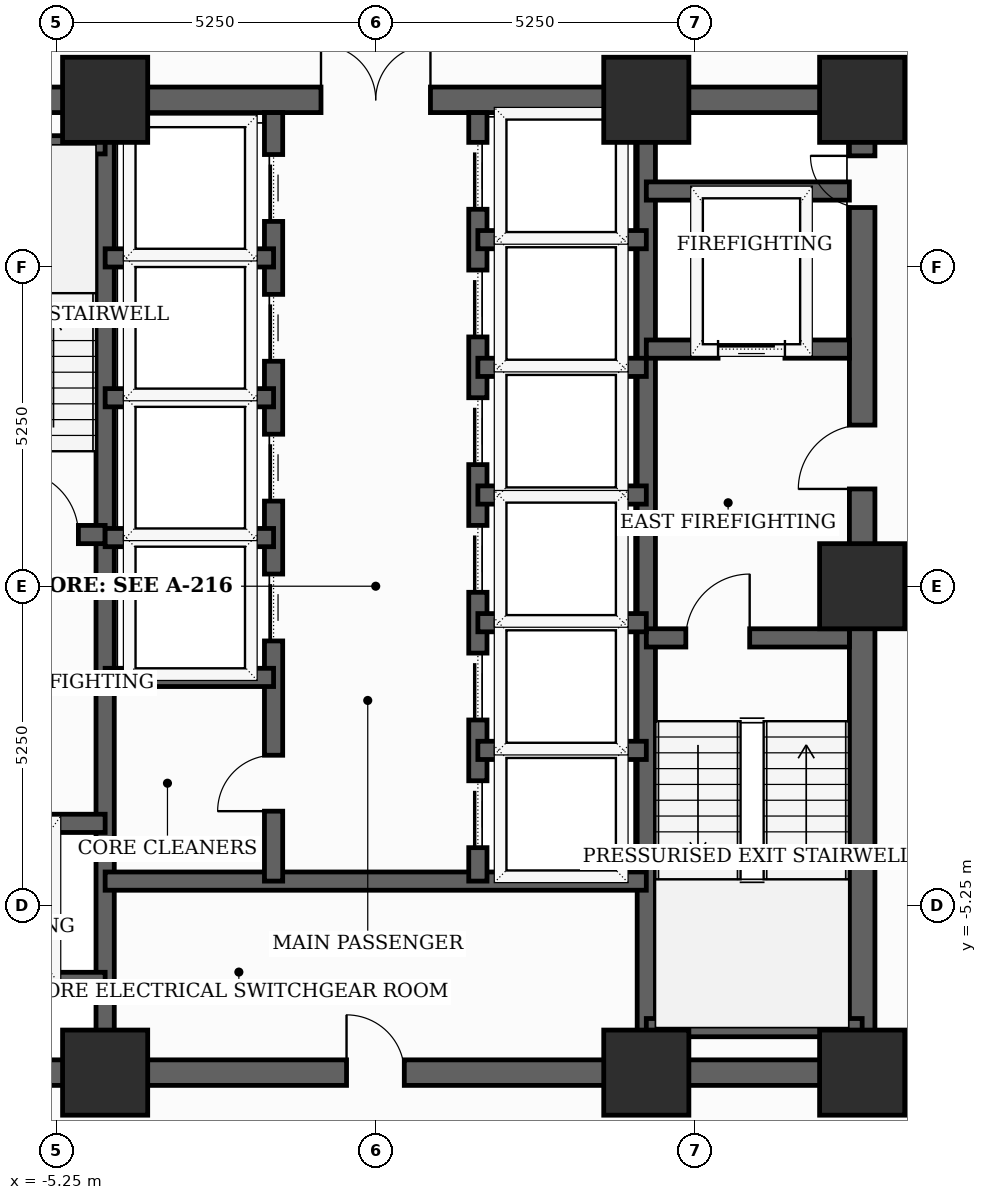
"""IFC4 building model, lengths in metres.
Left out: names, types, materials, properties, quantities, classifications, styles, units other than length and angle.
Written with IfcOpenShell. Run it as: python <this file> out.ifc"""

import sys

from ifc_helpers import new_model, si_unit, direction, frame, frame_2d, origin, origin_2d, place, context, subcontext, project, spatial, rectangle, extrude, element, fill, save


model = new_model("IFC4")
c1 = context("Model", 3, precision=1e-05, world=origin(), true_north=direction((0.0, 1.0)))
c2 = subcontext(c1, "Body", "Model", "MODEL_VIEW")
j1 = project(units=[si_unit("LENGTHUNIT", "METRE"), si_unit("PLANEANGLEUNIT", "RADIAN")], contexts=[c1])
p1 = place(None, origin())
s1 = spatial("IfcSite", under=j1, at=p1, CompositionType="ELEMENT")
p2 = place(p1, origin())
s2 = spatial("IfcBuilding", under=s1, at=p2, CompositionType="ELEMENT")
p3 = place(p2, frame((0.0, 0.0, 94.0)))
s3 = spatial("IfcBuildingStorey", under=s2, at=p3, CompositionType="ELEMENT", Elevation=94.0)
for number, where, z_axis, x_axis in (
    (1, (-4.45, -8.0, 0.0), (0.0, 0.0, 1.0), (1.0, 0.0, 0.0)),
    (2, (4.45, -8.0, 0.0), (0.0, 0.0, 1.0), (1.0, 0.0, 0.0)),
    (3, (8.0, -8.0, 0.0), (0.0, 0.0, 1.0), (1.0, 0.0, 0.0)),
    (4, (8.0, 0.0, 0.0), (0.0, 0.0, 1.0), (1.0, 0.0, 0.0)),
    (5, (8.0, 8.0, 0.0), (0.0, 0.0, 1.0), (1.0, 0.0, 0.0)),
    (6, (4.45, 8.0, 0.0), (0.0, 0.0, 1.0), (1.0, 0.0, 0.0)),
    (7, (-4.45, 8.0, 0.0), (0.0, 0.0, 1.0), (1.0, 0.0, 0.0)),
):
    element("IfcColumn", number, at=place(p3, frame(where, z_axis=z_axis, x_axis=x_axis)), inside=s3, PredefinedType="COLUMN", context=c2, shape_type="SweptSolid", body=[
        extrude(rectangle(XDim=1.4, YDim=1.4, at=origin_2d()), origin(), (0.0, 0.0, 1.0), 3.7),
    ])
p4 = place(p3, frame((8.0, -8.0, 0.0), z_axis=(0.0, 0.0, 1.0), x_axis=(0.0, 1.0, 0.0)))
e8 = element("IfcWall", 8, at=p4, inside=s3, PredefinedType="SHEAR", context=c2, shape_type="SweptSolid", body=[
    extrude(rectangle(XDim=16.0, YDim=0.42, at=frame_2d((8.0, 0.0))), origin(), (0.0, 0.0, 1.0), 3.5),
])
p5 = place(p4, frame((9.6, 0.0, 0.0)))
e9 = element("IfcOpeningElement", 9, at=p5, cuts=e8, PredefinedType="OPENING", context=c2, shape_type="SweptSolid", body=[
    extrude(rectangle(XDim=1.05, YDim=2.15, at=frame_2d((0.525, 1.075))), frame((0.0, 0.22, 0.0), z_axis=(0.0, -1.0, 0.0), x_axis=(1.0, 0.0, 0.0)), (0.0, 0.0, 1.0), 0.44),
])
p6 = place(p4, frame((14.229, 0.0, 0.0)))
e10 = element("IfcOpeningElement", 10, at=p6, cuts=e8, PredefinedType="OPENING", context=c2, shape_type="SweptSolid", body=[
    extrude(rectangle(XDim=0.85, YDim=2.02, at=frame_2d((0.425, 1.01))), frame((0.0, 0.22, 0.0), z_axis=(0.0, -1.0, 0.0), x_axis=(1.0, 0.0, 0.0)), (0.0, 0.0, 1.0), 0.44),
])
p7 = place(p3, frame((-8.0, -8.0, 0.0), z_axis=(0.0, 0.0, 1.0), x_axis=(1.0, 0.0, 0.0)))
e11 = element("IfcWall", 11, at=p7, inside=s3, PredefinedType="SHEAR", context=c2, shape_type="SweptSolid", body=[
    extrude(rectangle(XDim=16.0, YDim=0.42, at=frame_2d((8.0, 0.0))), origin(), (0.0, 0.0, 1.0), 3.5),
])
p8 = place(p7, frame((7.52, 0.0, 0.0)))
e12 = element("IfcOpeningElement", 12, at=p8, cuts=e11, PredefinedType="OPENING", context=c2, shape_type="SweptSolid", body=[
    extrude(rectangle(XDim=0.95, YDim=2.1, at=frame_2d((0.475, 1.05))), frame((0.0, 0.22, 0.0), z_axis=(0.0, -1.0, 0.0), x_axis=(1.0, 0.0, 0.0)), (0.0, 0.0, 1.0), 0.44),
])
p9 = place(p3, frame((-8.0, 8.0, 0.0), z_axis=(0.0, 0.0, 1.0), x_axis=(1.0, 0.0, 0.0)))
e13 = element("IfcWall", 13, at=p9, inside=s3, PredefinedType="SHEAR", context=c2, shape_type="SweptSolid", body=[
    extrude(rectangle(XDim=16.0, YDim=0.42, at=frame_2d((8.0, 0.0))), origin(), (0.0, 0.0, 1.0), 3.5),
])
p10 = place(p9, frame((7.1, 0.0, 0.0)))
e14 = element("IfcOpeningElement", 14, at=p10, cuts=e13, PredefinedType="OPENING", context=c2, shape_type="SweptSolid", body=[
    extrude(rectangle(XDim=1.8, YDim=2.15, at=frame_2d((0.9, 1.075))), frame((0.0, 0.22, 0.0), z_axis=(0.0, -1.0, 0.0), x_axis=(1.0, 0.0, 0.0)), (0.0, 0.0, 1.0), 0.44),
])
for number, where, z_axis, x_axis in (
    (15, (-4.45, -7.79, 0.0), (0.0, 0.0, 1.0), (0.0, 1.0, 0.0)),
    (16, (4.45, -7.79, 0.0), (0.0, 0.0, 1.0), (0.0, 1.0, 0.0)),
):
    element("IfcWall", number, at=place(p3, frame(where, z_axis=z_axis, x_axis=x_axis)), inside=s3, PredefinedType="SHEAR", context=c2, shape_type="SweptSolid", body=[
        extrude(rectangle(XDim=15.58, YDim=0.3, at=frame_2d((7.79, 0.0))), origin(), (0.0, 0.0, 1.0), 3.5),
    ])
p11 = place(p3, frame((-7.79, 0.85, 0.0), z_axis=(0.0, 0.0, 1.0), x_axis=(1.0, 0.0, 0.0)))
e17 = element("IfcWall", 17, at=p11, inside=s3, PredefinedType="SHEAR", context=c2, shape_type="SweptSolid", body=[
    extrude(rectangle(XDim=3.34, YDim=0.3, at=frame_2d((1.67, 0.0))), origin(), (0.0, 0.0, 1.0), 3.5),
])
p12 = place(p11, frame((1.85, 0.0, 0.0)))
e18 = element("IfcOpeningElement", 18, at=p12, cuts=e17, PredefinedType="OPENING", context=c2, shape_type="SweptSolid", body=[
    extrude(rectangle(XDim=1.05, YDim=2.15, at=frame_2d((0.525, 1.075))), frame((0.0, 0.16, 0.0), z_axis=(0.0, -1.0, 0.0), x_axis=(1.0, 0.0, 0.0)), (0.0, 0.0, 1.0), 0.32),
])
p13 = place(p3, frame((-7.79, 7.26, 0.0), z_axis=(0.0, 0.0, 1.0), x_axis=(1.0, 0.0, 0.0)))
e19 = element("IfcWall", 19, at=p13, inside=s3, PredefinedType="SHEAR", context=c2, shape_type="SweptSolid", body=[
    extrude(rectangle(XDim=3.34, YDim=0.3, at=frame_2d((1.67, 0.0))), origin(), (0.0, 0.0, 1.0), 3.5),
])
p14 = place(p3, frame((4.45, -0.85, 0.0), z_axis=(0.0, 0.0, 1.0), x_axis=(1.0, 0.0, 0.0)))
e20 = element("IfcWall", 20, at=p14, inside=s3, PredefinedType="SHEAR", context=c2, shape_type="SweptSolid", body=[
    extrude(rectangle(XDim=3.34, YDim=0.3, at=frame_2d((1.67, 0.0))), origin(), (0.0, 0.0, 1.0), 3.5),
])
p15 = place(p14, frame((0.65, 0.0, 0.0)))
e21 = element("IfcOpeningElement", 21, at=p15, cuts=e20, PredefinedType="OPENING", context=c2, shape_type="SweptSolid", body=[
    extrude(rectangle(XDim=1.05, YDim=2.15, at=frame_2d((0.525, 1.075))), frame((0.0, 0.16, 0.0), z_axis=(0.0, -1.0, 0.0), x_axis=(1.0, 0.0, 0.0)), (0.0, 0.0, 1.0), 0.32),
])
p16 = place(p3, frame((4.45, -7.26, 0.0), z_axis=(0.0, 0.0, 1.0), x_axis=(1.0, 0.0, 0.0)))
e22 = element("IfcWall", 22, at=p16, inside=s3, PredefinedType="SHEAR", context=c2, shape_type="SweptSolid", body=[
    extrude(rectangle(XDim=3.55, YDim=0.3, at=frame_2d((1.775, 0.0))), origin(), (0.0, 0.0, 1.0), 3.5),
])
p17 = place(p3, frame((-7.79, -3.9, 0.0), z_axis=(0.0, 0.0, 1.0), x_axis=(1.0, 0.0, 0.0)))
e23 = element("IfcWall", 23, at=p17, inside=s3, PredefinedType="SHEAR", context=c2, shape_type="SweptSolid", body=[
    extrude(rectangle(XDim=3.34, YDim=0.3, at=frame_2d((1.67, 0.0))), origin(), (0.0, 0.0, 1.0), 3.5),
])
p18 = place(p17, frame((1.27, 0.0, 0.0)))
e24 = element("IfcOpeningElement", 24, at=p18, cuts=e23, PredefinedType="OPENING", context=c2, shape_type="SweptSolid", body=[
    extrude(rectangle(XDim=1.1, YDim=2.1, at=frame_2d((0.55, 1.05))), frame((0.0, 0.16, 0.0), z_axis=(0.0, -1.0, 0.0), x_axis=(1.0, 0.0, 0.0)), (0.0, 0.0, 1.0), 0.32),
])
p19 = place(p3, frame((-7.79, -6.5, 0.0), z_axis=(0.0, 0.0, 1.0), x_axis=(1.0, 0.0, 0.0)))
e25 = element("IfcWall", 25, at=p19, inside=s3, PredefinedType="SHEAR", context=c2, shape_type="SweptSolid", body=[
    extrude(rectangle(XDim=3.34, YDim=0.3, at=frame_2d((1.67, 0.0))), origin(), (0.0, 0.0, 1.0), 3.5),
])
p20 = place(p3, frame((4.45, 3.9, 0.0), z_axis=(0.0, 0.0, 1.0), x_axis=(1.0, 0.0, 0.0)))
e26 = element("IfcWall", 26, at=p20, inside=s3, PredefinedType="SHEAR", context=c2, shape_type="SweptSolid", body=[
    extrude(rectangle(XDim=3.34, YDim=0.3, at=frame_2d((1.67, 0.0))), origin(), (0.0, 0.0, 1.0), 3.5),
])
p21 = place(p20, frame((1.18, 0.0, 0.0)))
e27 = element("IfcOpeningElement", 27, at=p21, cuts=e26, PredefinedType="OPENING", context=c2, shape_type="SweptSolid", body=[
    extrude(rectangle(XDim=1.1, YDim=2.1, at=frame_2d((0.55, 1.05))), frame((0.0, 0.16, 0.0), z_axis=(0.0, -1.0, 0.0), x_axis=(1.0, 0.0, 0.0)), (0.0, 0.0, 1.0), 0.32),
])
p22 = place(p3, frame((4.45, 6.5, 0.0), z_axis=(0.0, 0.0, 1.0), x_axis=(1.0, 0.0, 0.0)))
e28 = element("IfcWall", 28, at=p22, inside=s3, PredefinedType="SHEAR", context=c2, shape_type="SweptSolid", body=[
    extrude(rectangle(XDim=3.34, YDim=0.3, at=frame_2d((1.67, 0.0))), origin(), (0.0, 0.0, 1.0), 3.5),
])
p23 = place(p3, frame((-4.45, -4.85, 0.0), z_axis=(0.0, 0.0, 1.0), x_axis=(1.0, 0.0, 0.0)))
e29 = element("IfcWall", 29, at=p23, inside=s3, PredefinedType="SHEAR", context=c2, shape_type="SweptSolid", body=[
    extrude(rectangle(XDim=8.9, YDim=0.3, at=frame_2d((4.45, 0.0))), origin(), (0.0, 0.0, 1.0), 3.5),
])
p24 = place(p3, frame((-1.68, -4.85, 0.0), z_axis=(0.0, 0.0, 1.0), x_axis=(0.0, 1.0, 0.0)))
e30 = element("IfcWall", 30, at=p24, inside=s3, PredefinedType="SHEAR", context=c2, shape_type="SweptSolid", body=[
    extrude(rectangle(XDim=12.64, YDim=0.3, at=frame_2d((6.32, 0.0))), origin(), (0.0, 0.0, 1.0), 3.5),
])
p25 = place(p24, frame((3.95, 0.0, 0.0)))
e31 = element("IfcOpeningElement", 31, at=p25, cuts=e30, PredefinedType="OPENING", context=c2, shape_type="SweptSolid", body=[
    extrude(rectangle(XDim=1.1, YDim=2.1, at=frame_2d((0.55, 1.05))), frame((0.0, 0.16, 0.0), z_axis=(0.0, -1.0, 0.0), x_axis=(1.0, 0.0, 0.0)), (0.0, 0.0, 1.0), 0.32),
])
p26 = place(p24, frame((6.25, 0.0, 0.0)))
e32 = element("IfcOpeningElement", 32, at=p26, cuts=e30, PredefinedType="OPENING", context=c2, shape_type="SweptSolid", body=[
    extrude(rectangle(XDim=1.1, YDim=2.1, at=frame_2d((0.55, 1.05))), frame((0.0, 0.16, 0.0), z_axis=(0.0, -1.0, 0.0), x_axis=(1.0, 0.0, 0.0)), (0.0, 0.0, 1.0), 0.32),
])
p27 = place(p24, frame((8.55, 0.0, 0.0)))
e33 = element("IfcOpeningElement", 33, at=p27, cuts=e30, PredefinedType="OPENING", context=c2, shape_type="SweptSolid", body=[
    extrude(rectangle(XDim=1.1, YDim=2.1, at=frame_2d((0.55, 1.05))), frame((0.0, 0.16, 0.0), z_axis=(0.0, -1.0, 0.0), x_axis=(1.0, 0.0, 0.0)), (0.0, 0.0, 1.0), 0.32),
])
p28 = place(p24, frame((10.85, 0.0, 0.0)))
e34 = element("IfcOpeningElement", 34, at=p28, cuts=e30, PredefinedType="OPENING", context=c2, shape_type="SweptSolid", body=[
    extrude(rectangle(XDim=1.1, YDim=2.1, at=frame_2d((0.55, 1.05))), frame((0.0, 0.16, 0.0), z_axis=(0.0, -1.0, 0.0), x_axis=(1.0, 0.0, 0.0)), (0.0, 0.0, 1.0), 0.32),
])
p29 = place(p24, frame((1.15, 0.0, 0.0)))
e35 = element("IfcOpeningElement", 35, at=p29, cuts=e30, PredefinedType="OPENING", context=c2, shape_type="SweptSolid", body=[
    extrude(rectangle(XDim=0.92, YDim=2.1, at=frame_2d((0.46, 1.05))), frame((0.0, 0.16, 0.0), z_axis=(0.0, -1.0, 0.0), x_axis=(1.0, 0.0, 0.0)), (0.0, 0.0, 1.0), 0.32),
])
p30 = place(p3, frame((1.68, -4.85, 0.0), z_axis=(0.0, 0.0, 1.0), x_axis=(0.0, 1.0, 0.0)))
e36 = element("IfcWall", 36, at=p30, inside=s3, PredefinedType="SHEAR", context=c2, shape_type="SweptSolid", body=[
    extrude(rectangle(XDim=12.64, YDim=0.3, at=frame_2d((6.32, 0.0))), origin(), (0.0, 0.0, 1.0), 3.5),
])
p31 = place(p30, frame((0.55, 0.0, 0.0)))
e37 = element("IfcOpeningElement", 37, at=p31, cuts=e36, PredefinedType="OPENING", context=c2, shape_type="SweptSolid", body=[
    extrude(rectangle(XDim=1.1, YDim=2.1, at=frame_2d((0.55, 1.05))), frame((0.0, 0.16, 0.0), z_axis=(0.0, -1.0, 0.0), x_axis=(1.0, 0.0, 0.0)), (0.0, 0.0, 1.0), 0.32),
])
p32 = place(p30, frame((2.65, 0.0, 0.0)))
e38 = element("IfcOpeningElement", 38, at=p32, cuts=e36, PredefinedType="OPENING", context=c2, shape_type="SweptSolid", body=[
    extrude(rectangle(XDim=1.1, YDim=2.1, at=frame_2d((0.55, 1.05))), frame((0.0, 0.16, 0.0), z_axis=(0.0, -1.0, 0.0), x_axis=(1.0, 0.0, 0.0)), (0.0, 0.0, 1.0), 0.32),
])
p33 = place(p30, frame((4.75, 0.0, 0.0)))
e39 = element("IfcOpeningElement", 39, at=p33, cuts=e36, PredefinedType="OPENING", context=c2, shape_type="SweptSolid", body=[
    extrude(rectangle(XDim=1.1, YDim=2.1, at=frame_2d((0.55, 1.05))), frame((0.0, 0.16, 0.0), z_axis=(0.0, -1.0, 0.0), x_axis=(1.0, 0.0, 0.0)), (0.0, 0.0, 1.0), 0.32),
])
p34 = place(p30, frame((6.85, 0.0, 0.0)))
e40 = element("IfcOpeningElement", 40, at=p34, cuts=e36, PredefinedType="OPENING", context=c2, shape_type="SweptSolid", body=[
    extrude(rectangle(XDim=1.1, YDim=2.1, at=frame_2d((0.55, 1.05))), frame((0.0, 0.16, 0.0), z_axis=(0.0, -1.0, 0.0), x_axis=(1.0, 0.0, 0.0)), (0.0, 0.0, 1.0), 0.32),
])
p35 = place(p30, frame((8.95, 0.0, 0.0)))
e41 = element("IfcOpeningElement", 41, at=p35, cuts=e36, PredefinedType="OPENING", context=c2, shape_type="SweptSolid", body=[
    extrude(rectangle(XDim=1.1, YDim=2.1, at=frame_2d((0.55, 1.05))), frame((0.0, 0.16, 0.0), z_axis=(0.0, -1.0, 0.0), x_axis=(1.0, 0.0, 0.0)), (0.0, 0.0, 1.0), 0.32),
])
p36 = place(p30, frame((11.05, 0.0, 0.0)))
e42 = element("IfcOpeningElement", 42, at=p36, cuts=e36, PredefinedType="OPENING", context=c2, shape_type="SweptSolid", body=[
    extrude(rectangle(XDim=1.1, YDim=2.1, at=frame_2d((0.55, 1.05))), frame((0.0, 0.16, 0.0), z_axis=(0.0, -1.0, 0.0), x_axis=(1.0, 0.0, 0.0)), (0.0, 0.0, 1.0), 0.32),
])
for number, where, z_axis, x_axis in (
    (43, (-4.45, -1.5, 0.0), (0.0, 0.0, 1.0), (1.0, 0.0, 0.0)),
    (44, (-4.45, 0.8, 0.0), (0.0, 0.0, 1.0), (1.0, 0.0, 0.0)),
    (45, (-4.45, 3.1, 0.0), (0.0, 0.0, 1.0), (1.0, 0.0, 0.0)),
    (46, (-4.45, 5.4, 0.0), (0.0, 0.0, 1.0), (1.0, 0.0, 0.0)),
    (47, (1.68, 1.5, 0.0), (0.0, 0.0, 1.0), (1.0, 0.0, 0.0)),
    (48, (1.68, 3.6, 0.0), (0.0, 0.0, 1.0), (1.0, 0.0, 0.0)),
    (49, (1.68, 5.7, 0.0), (0.0, 0.0, 1.0), (1.0, 0.0, 0.0)),
    (50, (1.68, -2.7, 0.0), (0.0, 0.0, 1.0), (1.0, 0.0, 0.0)),
    (51, (1.68, -0.6, 0.0), (0.0, 0.0, 1.0), (1.0, 0.0, 0.0)),
):
    element("IfcWall", number, at=place(p3, frame(where, z_axis=z_axis, x_axis=x_axis)), inside=s3, PredefinedType="SHEAR", context=c2, shape_type="SweptSolid", body=[
        extrude(rectangle(XDim=2.77, YDim=0.3, at=frame_2d((1.385, 0.0))), origin(), (0.0, 0.0, 1.0), 3.5),
    ])
p37 = place(p5, origin())
e52 = element("IfcDoor", 52, at=p37, inside=s3, OperationType="SINGLE_SWING_LEFT", PredefinedType="DOOR", context=c2, shape_type="SweptSolid", body=[
    extrude(rectangle(XDim=1.05, YDim=2.15, at=frame_2d((0.525, 1.075))), frame((0.0, 0.025, 0.0), z_axis=(0.0, -1.0, 0.0), x_axis=(1.0, 0.0, 0.0)), (0.0, 0.0, 1.0), 0.05),
])
fill(e9, e52)
p38 = place(p6, origin())
e53 = element("IfcDoor", 53, at=p38, inside=s3, OperationType="SINGLE_SWING_RIGHT", PredefinedType="TRAPDOOR", context=c2, shape_type="SweptSolid", body=[
    extrude(rectangle(XDim=0.85, YDim=2.02, at=frame_2d((0.425, 1.01))), frame((0.0, 0.025, 0.0), z_axis=(0.0, -1.0, 0.0), x_axis=(1.0, 0.0, 0.0)), (0.0, 0.0, 1.0), 0.05),
])
fill(e10, e53)
p39 = place(p8, origin())
e54 = element("IfcDoor", 54, at=p39, inside=s3, OperationType="SINGLE_SWING_LEFT", PredefinedType="DOOR", context=c2, shape_type="SweptSolid", body=[
    extrude(rectangle(XDim=0.95, YDim=2.1, at=frame_2d((0.475, 1.05))), frame((0.0, 0.025, 0.0), z_axis=(0.0, -1.0, 0.0), x_axis=(1.0, 0.0, 0.0)), (0.0, 0.0, 1.0), 0.05),
])
fill(e12, e54)
p40 = place(p10, origin())
e55 = element("IfcDoor", 55, at=p40, inside=s3, OperationType="DOUBLE_DOOR_SINGLE_SWING", PredefinedType="DOOR", context=c2, shape_type="SweptSolid", body=[
    extrude(rectangle(XDim=1.8, YDim=2.15, at=frame_2d((0.9, 1.075))), frame((0.0, 0.025, 0.0), z_axis=(0.0, -1.0, 0.0), x_axis=(1.0, 0.0, 0.0)), (0.0, 0.0, 1.0), 0.05),
])
fill(e14, e55)
p41 = place(p12, origin())
e56 = element("IfcDoor", 56, at=p41, inside=s3, OperationType="SINGLE_SWING_LEFT", PredefinedType="DOOR", context=c2, shape_type="SweptSolid", body=[
    extrude(rectangle(XDim=1.05, YDim=2.15, at=frame_2d((0.525, 1.075))), frame((0.0, 0.025, 0.0), z_axis=(0.0, -1.0, 0.0), x_axis=(1.0, 0.0, 0.0)), (0.0, 0.0, 1.0), 0.05),
])
fill(e18, e56)
p42 = place(p15, origin())
e57 = element("IfcDoor", 57, at=p42, inside=s3, OperationType="SINGLE_SWING_RIGHT", PredefinedType="DOOR", context=c2, shape_type="SweptSolid", body=[
    extrude(rectangle(XDim=1.05, YDim=2.15, at=frame_2d((0.525, 1.075))), frame((0.0, 0.025, 0.0), z_axis=(0.0, -1.0, 0.0), x_axis=(1.0, 0.0, 0.0)), (0.0, 0.0, 1.0), 0.05),
])
fill(e21, e57)
p43 = place(p21, origin())
e58 = element("IfcDoor", 58, at=p43, inside=s3, OperationType="SLIDING_TO_LEFT", PredefinedType="DOOR", context=c2, shape_type="SweptSolid", body=[
    extrude(rectangle(XDim=1.1, YDim=2.1, at=frame_2d((0.55, 1.05))), frame((0.0, 0.025, 0.0), z_axis=(0.0, -1.0, 0.0), x_axis=(1.0, 0.0, 0.0)), (0.0, 0.0, 1.0), 0.05),
])
fill(e27, e58)
p44 = place(p25, origin())
e59 = element("IfcDoor", 59, at=p44, inside=s3, OperationType="SLIDING_TO_LEFT", PredefinedType="DOOR", context=c2, shape_type="SweptSolid", body=[
    extrude(rectangle(XDim=1.1, YDim=2.1, at=frame_2d((0.55, 1.05))), frame((0.0, 0.025, 0.0), z_axis=(0.0, -1.0, 0.0), x_axis=(1.0, 0.0, 0.0)), (0.0, 0.0, 1.0), 0.05),
])
fill(e31, e59)
p45 = place(p26, origin())
e60 = element("IfcDoor", 60, at=p45, inside=s3, OperationType="SLIDING_TO_LEFT", PredefinedType="DOOR", context=c2, shape_type="SweptSolid", body=[
    extrude(rectangle(XDim=1.1, YDim=2.1, at=frame_2d((0.55, 1.05))), frame((0.0, 0.025, 0.0), z_axis=(0.0, -1.0, 0.0), x_axis=(1.0, 0.0, 0.0)), (0.0, 0.0, 1.0), 0.05),
])
fill(e32, e60)
p46 = place(p27, origin())
e61 = element("IfcDoor", 61, at=p46, inside=s3, OperationType="SLIDING_TO_LEFT", PredefinedType="DOOR", context=c2, shape_type="SweptSolid", body=[
    extrude(rectangle(XDim=1.1, YDim=2.1, at=frame_2d((0.55, 1.05))), frame((0.0, 0.025, 0.0), z_axis=(0.0, -1.0, 0.0), x_axis=(1.0, 0.0, 0.0)), (0.0, 0.0, 1.0), 0.05),
])
fill(e33, e61)
p47 = place(p28, origin())
e62 = element("IfcDoor", 62, at=p47, inside=s3, OperationType="SLIDING_TO_LEFT", PredefinedType="DOOR", context=c2, shape_type="SweptSolid", body=[
    extrude(rectangle(XDim=1.1, YDim=2.1, at=frame_2d((0.55, 1.05))), frame((0.0, 0.025, 0.0), z_axis=(0.0, -1.0, 0.0), x_axis=(1.0, 0.0, 0.0)), (0.0, 0.0, 1.0), 0.05),
])
fill(e34, e62)
p48 = place(p29, origin())
e63 = element("IfcDoor", 63, at=p48, inside=s3, OperationType="SINGLE_SWING_LEFT", PredefinedType="DOOR", context=c2, shape_type="SweptSolid", body=[
    extrude(rectangle(XDim=0.92, YDim=2.1, at=frame_2d((0.46, 1.05))), frame((0.0, 0.025, 0.0), z_axis=(0.0, -1.0, 0.0), x_axis=(1.0, 0.0, 0.0)), (0.0, 0.0, 1.0), 0.05),
])
fill(e35, e63)
p49 = place(p31, origin())
e64 = element("IfcDoor", 64, at=p49, inside=s3, OperationType="SLIDING_TO_LEFT", PredefinedType="DOOR", context=c2, shape_type="SweptSolid", body=[
    extrude(rectangle(XDim=1.1, YDim=2.1, at=frame_2d((0.55, 1.05))), frame((0.0, 0.025, 0.0), z_axis=(0.0, -1.0, 0.0), x_axis=(1.0, 0.0, 0.0)), (0.0, 0.0, 1.0), 0.05),
])
fill(e37, e64)
p50 = place(p32, origin())
e65 = element("IfcDoor", 65, at=p50, inside=s3, OperationType="SLIDING_TO_LEFT", PredefinedType="DOOR", context=c2, shape_type="SweptSolid", body=[
    extrude(rectangle(XDim=1.1, YDim=2.1, at=frame_2d((0.55, 1.05))), frame((0.0, 0.025, 0.0), z_axis=(0.0, -1.0, 0.0), x_axis=(1.0, 0.0, 0.0)), (0.0, 0.0, 1.0), 0.05),
])
fill(e38, e65)
p51 = place(p33, origin())
e66 = element("IfcDoor", 66, at=p51, inside=s3, OperationType="SLIDING_TO_LEFT", PredefinedType="DOOR", context=c2, shape_type="SweptSolid", body=[
    extrude(rectangle(XDim=1.1, YDim=2.1, at=frame_2d((0.55, 1.05))), frame((0.0, 0.025, 0.0), z_axis=(0.0, -1.0, 0.0), x_axis=(1.0, 0.0, 0.0)), (0.0, 0.0, 1.0), 0.05),
])
fill(e39, e66)
p52 = place(p34, origin())
e67 = element("IfcDoor", 67, at=p52, inside=s3, OperationType="SLIDING_TO_LEFT", PredefinedType="DOOR", context=c2, shape_type="SweptSolid", body=[
    extrude(rectangle(XDim=1.1, YDim=2.1, at=frame_2d((0.55, 1.05))), frame((0.0, 0.025, 0.0), z_axis=(0.0, -1.0, 0.0), x_axis=(1.0, 0.0, 0.0)), (0.0, 0.0, 1.0), 0.05),
])
fill(e40, e67)
p53 = place(p35, origin())
e68 = element("IfcDoor", 68, at=p53, inside=s3, OperationType="SLIDING_TO_LEFT", PredefinedType="DOOR", context=c2, shape_type="SweptSolid", body=[
    extrude(rectangle(XDim=1.1, YDim=2.1, at=frame_2d((0.55, 1.05))), frame((0.0, 0.025, 0.0), z_axis=(0.0, -1.0, 0.0), x_axis=(1.0, 0.0, 0.0)), (0.0, 0.0, 1.0), 0.05),
])
fill(e41, e68)
p54 = place(p36, origin())
e69 = element("IfcDoor", 69, at=p54, inside=s3, OperationType="SLIDING_TO_LEFT", PredefinedType="DOOR", context=c2, shape_type="SweptSolid", body=[
    extrude(rectangle(XDim=1.1, YDim=2.1, at=frame_2d((0.55, 1.05))), frame((0.0, 0.025, 0.0), z_axis=(0.0, -1.0, 0.0), x_axis=(1.0, 0.0, 0.0)), (0.0, 0.0, 1.0), 0.05),
])
fill(e42, e69)
save(model, sys.argv[1])
